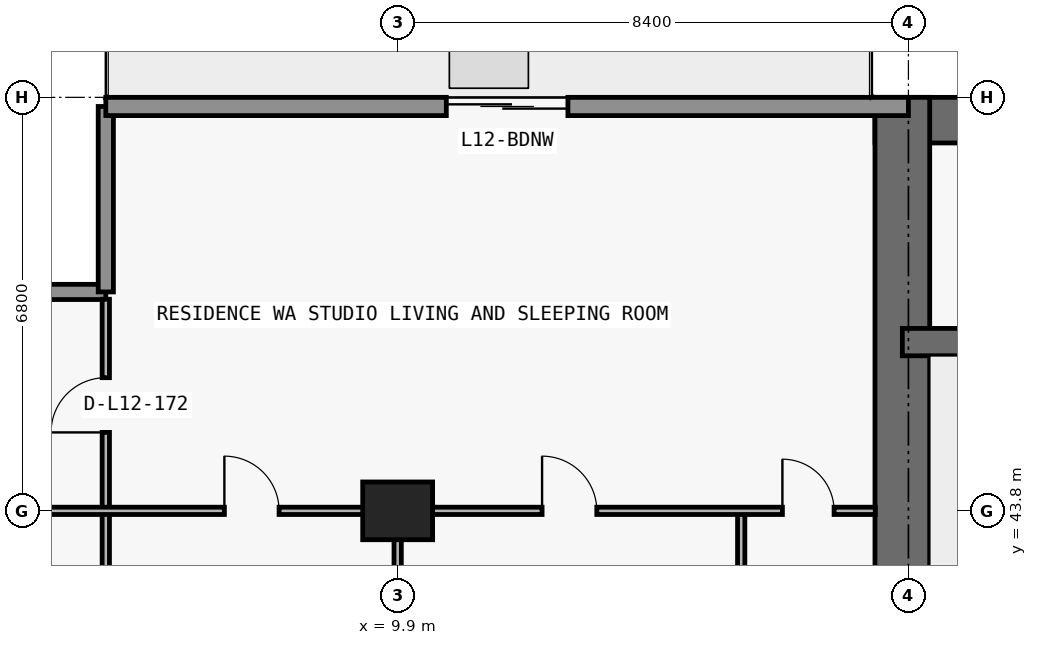
"""IFC4 building model, lengths in metres.
Left out: names, types, materials, properties, quantities, classifications, styles, units other than length and angle.
Written with IfcOpenShell. Run it as: python <this file> out.ifc"""

import sys

from ifc_helpers import new_model, si_unit, direction, frame, frame_2d, origin, origin_2d, place, context, subcontext, project, spatial, rectangle, extrude, element, fill, save


model = new_model("IFC4")
c1 = context("Model", 3, precision=1e-05, world=origin(), true_north=direction((0.0, 1.0)))
c2 = subcontext(c1, "Body", "Model", "MODEL_VIEW")
j1 = project(units=[si_unit("LENGTHUNIT", "METRE"), si_unit("PLANEANGLEUNIT", "RADIAN")], contexts=[c1])
p1 = place(None, origin())
s1 = spatial("IfcSite", under=j1, at=p1, CompositionType="ELEMENT")
p2 = place(p1, origin())
s2 = spatial("IfcBuilding", under=s1, at=p2, CompositionType="ELEMENT")
p3 = place(p2, frame((0.0, 0.0, 49.8)))
s3 = spatial("IfcBuildingStorey", under=s2, at=p3, CompositionType="ELEMENT", Elevation=49.8)
p4 = place(p3, frame((9.9, 43.8, 0.0), z_axis=(0.0, 0.0, 1.0), x_axis=(1.0, 0.0, 0.0)))
e1 = element("IfcColumn", 1, at=p4, inside=s3, PredefinedType="COLUMN", context=c2, shape_type="SweptSolid", body=[
    extrude(rectangle(XDim=1.15, YDim=0.95, at=origin_2d()), origin(), (0.0, 0.0, 1.0), 3.05),
])
p5 = place(p3, frame((17.75, 50.225, 0.0), z_axis=(0.0, 0.0, 1.0), x_axis=(1.0, 0.0, 0.0)))
e2 = element("IfcWall", 2, at=p5, inside=s3, PredefinedType="SHEAR", context=c2, shape_type="SweptSolid", body=[
    extrude(rectangle(XDim=42.3, YDim=0.75, at=frame_2d((21.15, 0.0))), origin(), (0.0, 0.0, 1.0), 3.05),
])
p6 = place(p3, frame((18.2, 36.45, 0.0), z_axis=(0.0, 0.0, 1.0), x_axis=(0.0, 1.0, 0.0)))
e3 = element("IfcWall", 3, at=p6, inside=s3, PredefinedType="SHEAR", context=c2, shape_type="SweptSolid", body=[
    extrude(rectangle(XDim=14.15, YDim=0.9, at=frame_2d((7.075, 0.0))), origin(), (0.0, 0.0, 1.0), 3.05),
])
p7 = place(p3, frame((18.2, 46.575, 0.0), z_axis=(0.0, 0.0, 1.0), x_axis=(1.0, 0.0, 0.0)))
e4 = element("IfcWall", 4, at=p7, inside=s3, PredefinedType="SHEAR", context=c2, shape_type="SweptSolid", body=[
    extrude(rectangle(XDim=41.4, YDim=0.45, at=frame_2d((20.7, 0.0))), origin(), (0.0, 0.0, 1.0), 3.05),
])
p8 = place(p7, frame((7.675, 0.0, 0.0)))
e5 = element("IfcOpeningElement", 5, at=p8, cuts=e4, PredefinedType="OPENING", context=c2, shape_type="SweptSolid", body=[
    extrude(rectangle(XDim=1.05, YDim=2.15, at=frame_2d((0.525, 1.075))), frame((0.0, 0.235, 0.0), z_axis=(0.0, -1.0, 0.0), x_axis=(1.0, 0.0, 0.0)), (0.0, 0.0, 1.0), 0.47),
])
p9 = place(p7, frame((32.725, 0.0, 0.0)))
e6 = element("IfcOpeningElement", 6, at=p9, cuts=e4, PredefinedType="OPENING", context=c2, shape_type="SweptSolid", body=[
    extrude(rectangle(XDim=1.05, YDim=2.15, at=frame_2d((0.525, 1.075))), frame((0.0, 0.235, 0.0), z_axis=(0.0, -1.0, 0.0), x_axis=(1.0, 0.0, 0.0)), (0.0, 0.0, 1.0), 0.47),
])
p10 = place(p3, frame((1.65, 47.4, 0.0), z_axis=(0.0, 0.0, 1.0), x_axis=(1.0, 0.0, 0.0)))
e7 = element("IfcWall", 7, at=p10, inside=s3, PredefinedType="ELEMENTEDWALL", context=c2, shape_type="SweptSolid", body=[
    extrude(rectangle(XDim=3.45, YDim=0.25, at=frame_2d((1.725, 0.0))), origin(), (0.0, 0.0, 1.0), 3.05),
])
p11 = place(p3, frame((5.1, 47.4, 0.0), z_axis=(0.0, 0.0, 1.0), x_axis=(0.0, 1.0, 0.0)))
e8 = element("IfcWall", 8, at=p11, inside=s3, PredefinedType="ELEMENTEDWALL", context=c2, shape_type="SweptSolid", body=[
    extrude(rectangle(XDim=3.05, YDim=0.25, at=frame_2d((1.525, 0.0))), origin(), (0.0, 0.0, 1.0), 3.05),
])
p12 = place(p3, frame((5.1, 50.45, 0.0), z_axis=(0.0, 0.0, 1.0), x_axis=(1.0, 0.0, 0.0)))
e9 = element("IfcWall", 9, at=p12, inside=s3, PredefinedType="STANDARD", context=c2, shape_type="SweptSolid", body=[
    extrude(rectangle(XDim=13.2, YDim=0.3, at=frame_2d((6.6, 0.0))), origin(), (0.0, 0.0, 1.0), 3.05),
])
p13 = place(p12, frame((5.6, 0.0, 0.0)))
e10 = element("IfcOpeningElement", 10, at=p13, cuts=e9, PredefinedType="OPENING", context=c2, shape_type="SweptSolid", body=[
    extrude(rectangle(XDim=2.0, YDim=2.3, at=frame_2d((1.0, 1.15))), frame((0.0, 0.16, 0.0), z_axis=(0.0, -1.0, 0.0), x_axis=(1.0, 0.0, 0.0)), (0.0, 0.0, 1.0), 0.32),
])
p14 = place(p3, frame((5.1, 36.905, 0.0), z_axis=(0.0, 0.0, 1.0), x_axis=(0.0, 1.0, 0.0)))
e11 = element("IfcWall", 11, at=p14, inside=s3, PredefinedType="PARTITIONING", context=c2, shape_type="SweptSolid", body=[
    extrude(rectangle(XDim=10.375, YDim=0.12, at=frame_2d((5.188, 0.0))), origin(), (0.0, 0.0, 1.0), 3.05),
])
p15 = place(p14, frame((2.998, 0.0, 0.0)))
e12 = element("IfcOpeningElement", 12, at=p15, cuts=e11, PredefinedType="OPENING", context=c2, shape_type="SweptSolid", body=[
    extrude(rectangle(XDim=0.9, YDim=2.15, at=frame_2d((0.45, 1.075))), frame((0.0, 0.07, 0.0), z_axis=(0.0, -1.0, 0.0), x_axis=(1.0, 0.0, 0.0)), (0.0, 0.0, 1.0), 0.14),
])
p16 = place(p14, frame((8.185, 0.0, 0.0)))
e13 = element("IfcOpeningElement", 13, at=p16, cuts=e11, PredefinedType="OPENING", context=c2, shape_type="SweptSolid", body=[
    extrude(rectangle(XDim=0.9, YDim=2.15, at=frame_2d((0.45, 1.075))), frame((0.0, 0.07, 0.0), z_axis=(0.0, -1.0, 0.0), x_axis=(1.0, 0.0, 0.0)), (0.0, 0.0, 1.0), 0.14),
])
p17 = place(p3, frame((9.9, 36.9, 0.0), z_axis=(0.0, 0.0, 1.0), x_axis=(0.0, 1.0, 0.0)))
e14 = element("IfcWall", 14, at=p17, inside=s3, PredefinedType="PARTITIONING", context=c2, shape_type="SweptSolid", body=[
    extrude(rectangle(XDim=6.9, YDim=0.12, at=frame_2d((3.45, 0.0))), origin(), (0.0, 0.0, 1.0), 2.11),
])
p18 = place(p3, frame((15.55, 36.9, 0.0), z_axis=(0.0, 0.0, 1.0), x_axis=(0.0, 1.0, 0.0)))
e15 = element("IfcWall", 15, at=p18, inside=s3, PredefinedType="PARTITIONING", context=c2, shape_type="SweptSolid", body=[
    extrude(rectangle(XDim=6.9, YDim=0.12, at=frame_2d((3.45, 0.0))), origin(), (0.0, 0.0, 1.0), 2.499),
])
p19 = place(p18, frame((1.231, 0.0, 0.0)))
e16 = element("IfcOpeningElement", 16, at=p19, cuts=e15, PredefinedType="OPENING", context=c2, shape_type="SweptSolid", body=[
    extrude(rectangle(XDim=0.85, YDim=2.1, at=frame_2d((0.425, 1.05))), frame((0.0, 0.07, 0.0), z_axis=(0.0, -1.0, 0.0), x_axis=(1.0, 0.0, 0.0)), (0.0, 0.0, 1.0), 0.14),
])
p20 = place(p3, frame((1.795, 43.8, 0.0), z_axis=(0.0, 0.0, 1.0), x_axis=(1.0, 0.0, 0.0)))
e17 = element("IfcWall", 17, at=p20, inside=s3, PredefinedType="PARTITIONING", context=c2, shape_type="SweptSolid", body=[
    extrude(rectangle(XDim=15.96, YDim=0.12, at=frame_2d((7.98, 0.0))), origin(), (0.0, 0.0, 1.0), 2.339),
])
p21 = place(p20, frame((5.255, 0.0, 0.0)))
e18 = element("IfcOpeningElement", 18, at=p21, cuts=e17, PredefinedType="OPENING", context=c2, shape_type="SweptSolid", body=[
    extrude(rectangle(XDim=0.9, YDim=2.15, at=frame_2d((0.45, 1.075))), frame((0.0, 0.07, 0.0), z_axis=(0.0, -1.0, 0.0), x_axis=(1.0, 0.0, 0.0)), (0.0, 0.0, 1.0), 0.14),
])
p22 = place(p20, frame((10.48, 0.0, 0.0)))
e19 = element("IfcOpeningElement", 19, at=p22, cuts=e17, PredefinedType="OPENING", context=c2, shape_type="SweptSolid", body=[
    extrude(rectangle(XDim=0.9, YDim=2.15, at=frame_2d((0.45, 1.075))), frame((0.0, 0.07, 0.0), z_axis=(0.0, -1.0, 0.0), x_axis=(1.0, 0.0, 0.0)), (0.0, 0.0, 1.0), 0.14),
])
p23 = place(p20, frame((14.433, 0.0, 0.0)))
e20 = element("IfcOpeningElement", 20, at=p23, cuts=e17, PredefinedType="OPENING", context=c2, shape_type="SweptSolid", body=[
    extrude(rectangle(XDim=0.85, YDim=2.1, at=frame_2d((0.425, 1.05))), frame((0.0, 0.07, 0.0), z_axis=(0.0, -1.0, 0.0), x_axis=(1.0, 0.0, 0.0)), (0.0, 0.0, 1.0), 0.14),
])
p24 = place(p13, origin())
e21 = element("IfcDoor", 21, at=p24, inside=s3, OperationType="DOUBLE_DOOR_SLIDING", PredefinedType="DOOR", context=c2, shape_type="SweptSolid", body=[
    extrude(rectangle(XDim=2.0, YDim=2.3, at=frame_2d((1.0, 1.15))), frame((0.0, 0.025, 0.0), z_axis=(0.0, -1.0, 0.0), x_axis=(1.0, 0.0, 0.0)), (0.0, 0.0, 1.0), 0.05),
])
fill(e10, e21)
p25 = place(p21, origin())
e22 = element("IfcDoor", 22, at=p25, inside=s3, OperationType="SINGLE_SWING_LEFT", PredefinedType="DOOR", context=c2, shape_type="SweptSolid", body=[
    extrude(rectangle(XDim=0.9, YDim=2.15, at=frame_2d((0.45, 1.075))), frame((0.0, 0.025, 0.0), z_axis=(0.0, -1.0, 0.0), x_axis=(1.0, 0.0, 0.0)), (0.0, 0.0, 1.0), 0.05),
])
fill(e18, e22)
p26 = place(p22, origin())
e23 = element("IfcDoor", 23, at=p26, inside=s3, OperationType="SINGLE_SWING_LEFT", PredefinedType="DOOR", context=c2, shape_type="SweptSolid", body=[
    extrude(rectangle(XDim=0.9, YDim=2.15, at=frame_2d((0.45, 1.075))), frame((0.0, 0.025, 0.0), z_axis=(0.0, -1.0, 0.0), x_axis=(1.0, 0.0, 0.0)), (0.0, 0.0, 1.0), 0.05),
])
fill(e19, e23)
p27 = place(p23, origin())
e24 = element("IfcDoor", 24, at=p27, inside=s3, OperationType="SINGLE_SWING_LEFT", PredefinedType="DOOR", context=c2, shape_type="SweptSolid", body=[
    extrude(rectangle(XDim=0.85, YDim=2.1, at=frame_2d((0.425, 1.05))), frame((0.0, 0.025, 0.0), z_axis=(0.0, -1.0, 0.0), x_axis=(1.0, 0.0, 0.0)), (0.0, 0.0, 1.0), 0.05),
])
fill(e20, e24)
p28 = place(p16, origin())
e25 = element("IfcDoor", 25, at=p28, inside=s3, OperationType="SINGLE_SWING_LEFT", PredefinedType="DOOR", context=c2, shape_type="SweptSolid", body=[
    extrude(rectangle(XDim=0.9, YDim=2.15, at=frame_2d((0.45, 1.075))), frame((0.0, 0.025, 0.0), z_axis=(0.0, -1.0, 0.0), x_axis=(1.0, 0.0, 0.0)), (0.0, 0.0, 1.0), 0.05),
])
fill(e13, e25)
save(model, sys.argv[1])
